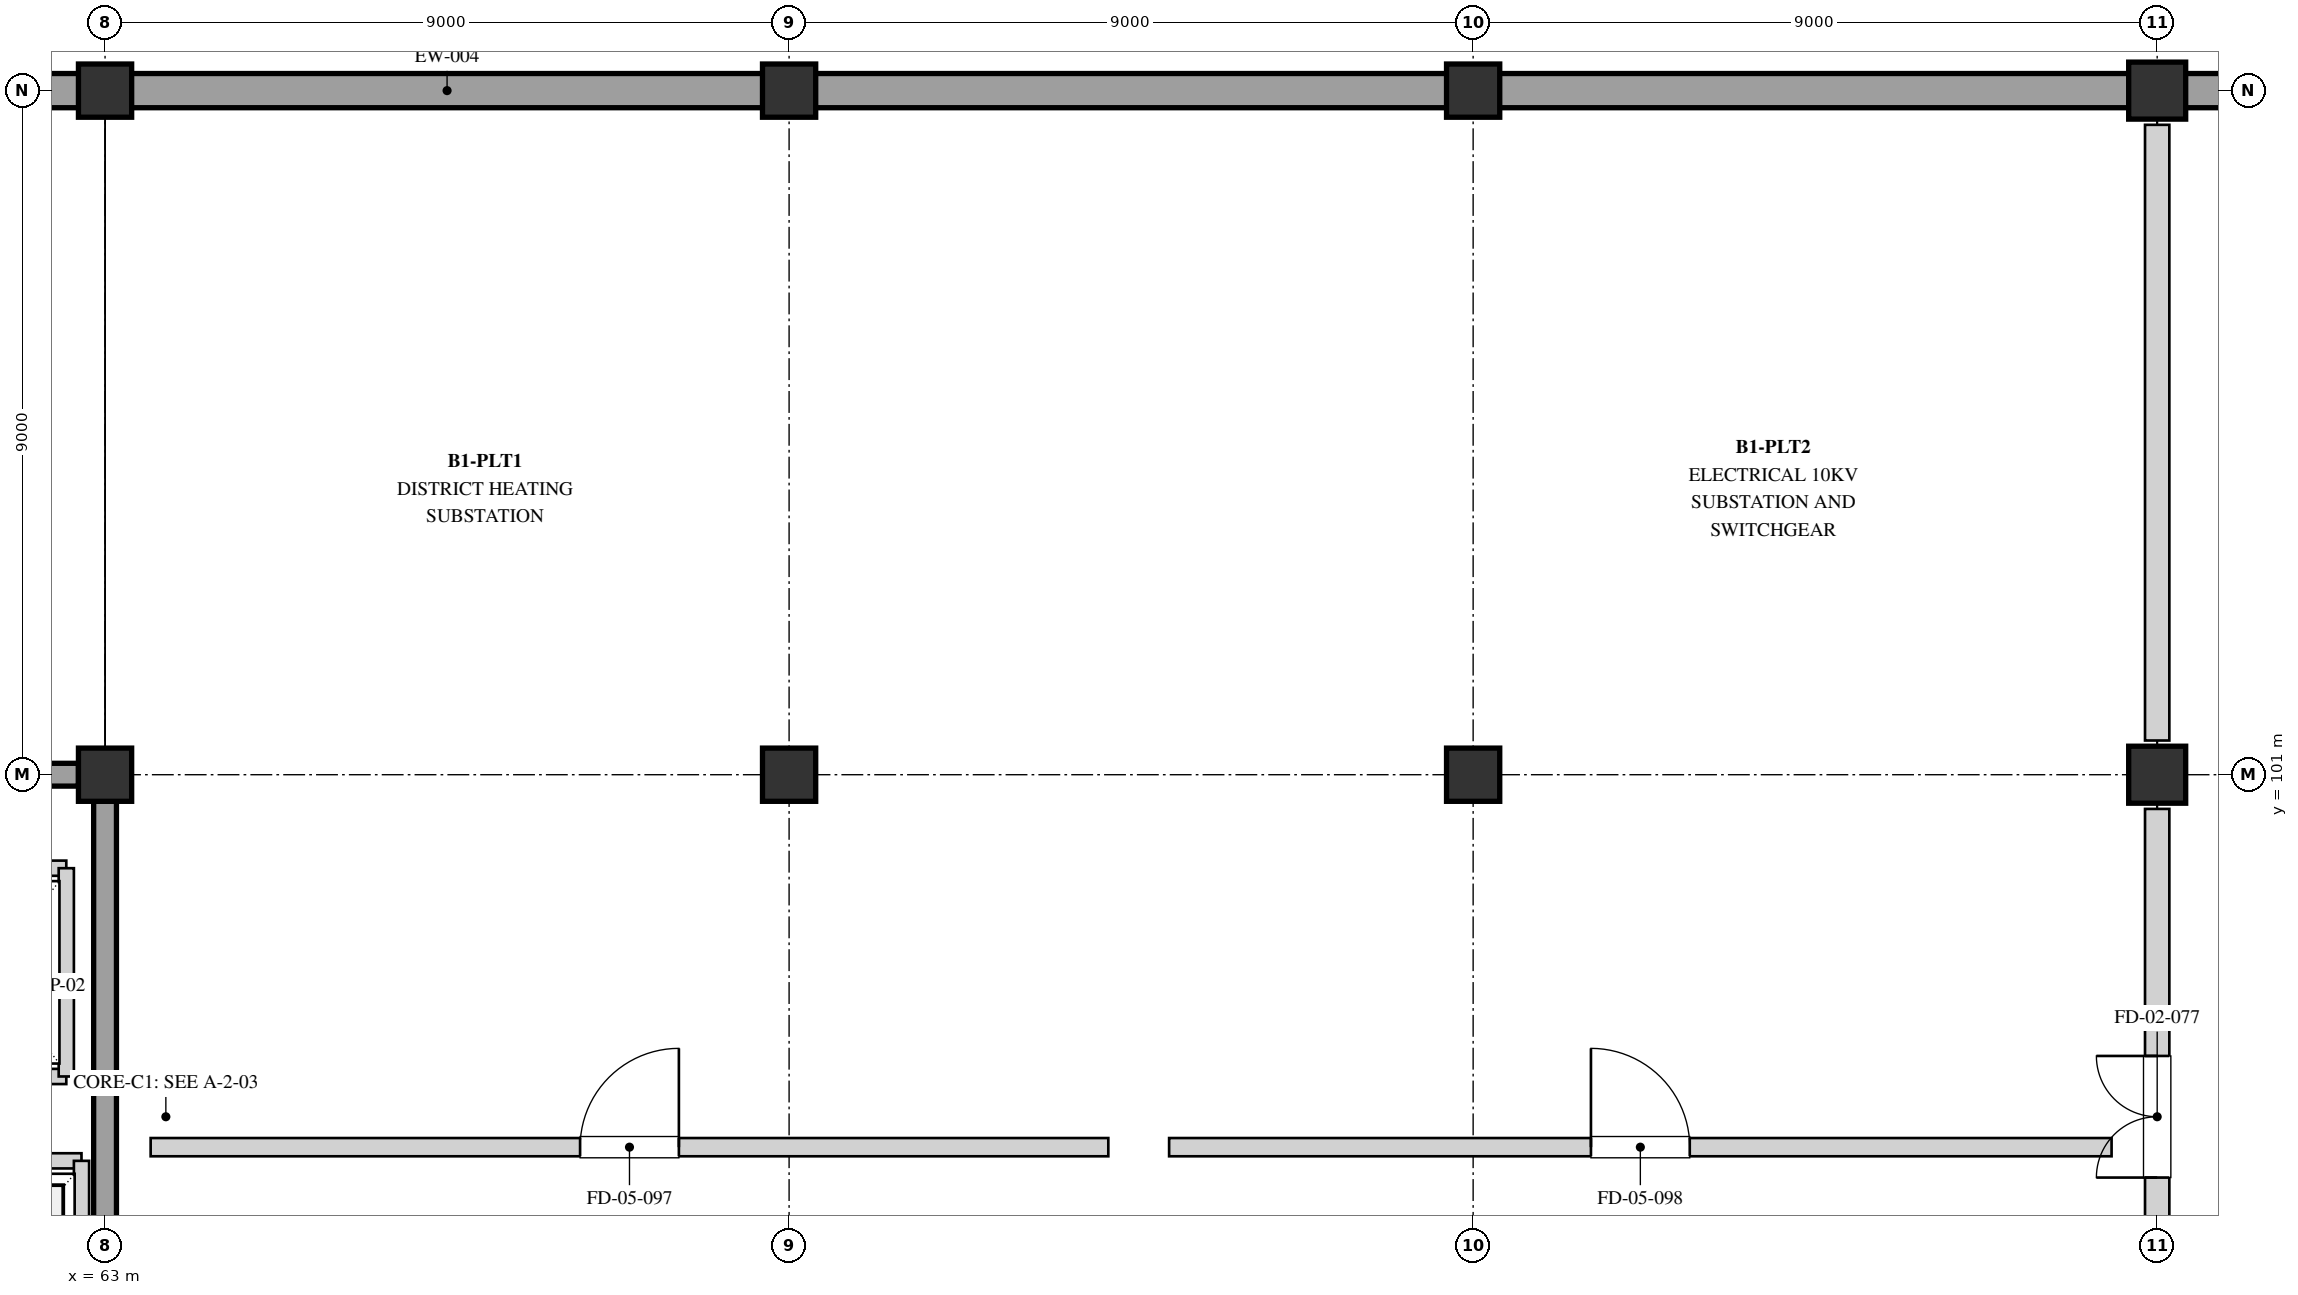
"""IFC4 building model, lengths in metres.
Left out: names, types, materials, properties, quantities, classifications, styles, units other than length and angle.
Written with IfcOpenShell. Run it as: python <this file> out.ifc"""

import sys

from ifc_helpers import new_model, si_unit, direction, frame, frame_2d, origin, origin_2d, place, context, subcontext, project, spatial, rectangle, extrude, element, fill, save


model = new_model("IFC4")
c1 = context("Model", 3, precision=1e-05, world=origin(), true_north=direction((0.0, 1.0)))
c2 = subcontext(c1, "Body", "Model", "MODEL_VIEW")
j1 = project(units=[si_unit("LENGTHUNIT", "METRE"), si_unit("PLANEANGLEUNIT", "RADIAN")], contexts=[c1])
p1 = place(None, origin())
s1 = spatial("IfcSite", under=j1, at=p1, CompositionType="ELEMENT")
p2 = place(p1, origin())
s2 = spatial("IfcBuilding", under=s1, at=p2, CompositionType="ELEMENT")
p3 = place(p2, frame((0.0, 0.0, -4.2)))
s3 = spatial("IfcBuildingStorey", under=s2, at=p3, CompositionType="ELEMENT", Elevation=-4.2)
for number, where, z_axis, x_axis in (
    (1, (63.0, 101.0, 0.0), (0.0, 0.0, 1.0), (1.0, 0.0, 0.0)),
    (2, (63.0, 110.0, 0.0), (0.0, 0.0, 1.0), (1.0, 0.0, 0.0)),
    (3, (72.0, 101.0, 0.0), (0.0, 0.0, 1.0), (1.0, 0.0, 0.0)),
    (4, (72.0, 110.0, 0.0), (0.0, 0.0, 1.0), (1.0, 0.0, 0.0)),
    (5, (81.0, 101.0, 0.0), (0.0, 0.0, 1.0), (1.0, 0.0, 0.0)),
    (6, (81.0, 110.0, 0.0), (0.0, 0.0, 1.0), (1.0, 0.0, 0.0)),
):
    element("IfcColumn", number, at=place(p3, frame(where, z_axis=z_axis, x_axis=x_axis)), inside=s3, PredefinedType="COLUMN", context=c2, shape_type="SweptSolid", body=[
        extrude(rectangle(XDim=0.7, YDim=0.7, at=origin_2d()), origin(), (0.0, 0.0, 1.0), 4.2),
    ])
for number, where, z_axis, x_axis in (
    (7, (90.0, 101.0, 0.0), (0.0, 0.0, 1.0), (1.0, 0.0, 0.0)),
    (8, (90.0, 110.0, 0.0), (0.0, 0.0, 1.0), (1.0, 0.0, 0.0)),
):
    element("IfcColumn", number, at=place(p3, frame(where, z_axis=z_axis, x_axis=x_axis)), inside=s3, PredefinedType="COLUMN", context=c2, shape_type="SweptSolid", body=[
        extrude(rectangle(XDim=0.75, YDim=0.75, at=origin_2d()), origin(), (0.0, 0.0, 1.0), 4.2),
    ])
p4 = place(p3, frame((54.8, 110.0, 0.0), z_axis=(0.0, 0.0, 1.0), x_axis=(1.0, 0.0, 0.0)))
e9 = element("IfcWall", 9, at=p4, inside=s3, PredefinedType="USERDEFINED", context=c2, shape_type="SweptSolid", body=[
    extrude(rectangle(XDim=8.2, YDim=0.45, at=frame_2d((4.1, 0.0))), origin(), (0.0, 0.0, 1.0), 3.86),
])
for number, where, z_axis, x_axis in (
    (10, (63.0, 110.0, 0.0), (0.0, 0.0, 1.0), (1.0, 0.0, 0.0)),
    (11, (72.0, 110.0, 0.0), (0.0, 0.0, 1.0), (1.0, 0.0, 0.0)),
    (12, (81.0, 110.0, 0.0), (0.0, 0.0, 1.0), (1.0, 0.0, 0.0)),
    (13, (90.0, 110.0, 0.0), (0.0, 0.0, 1.0), (1.0, 0.0, 0.0)),
):
    element("IfcWall", number, at=place(p3, frame(where, z_axis=z_axis, x_axis=x_axis)), inside=s3, PredefinedType="USERDEFINED", context=c2, shape_type="SweptSolid", body=[
        extrude(rectangle(XDim=9.0, YDim=0.45, at=frame_2d((4.5, 0.0))), origin(), (0.0, 0.0, 1.0), 3.86),
    ])
p5 = place(p3, frame((63.0, 92.35, 0.0), z_axis=(0.0, 0.0, 1.0), x_axis=(0.0, 1.0, 0.0)))
e14 = element("IfcWall", 14, at=p5, inside=s3, PredefinedType="SHEAR", context=c2, shape_type="SweptSolid", body=[
    extrude(rectangle(XDim=8.3, YDim=0.3, at=frame_2d((4.15, 0.0))), origin(), (0.0, 0.0, 1.0), 3.82),
])
p6 = place(p3, frame((55.15, 101.0, 0.0), z_axis=(0.0, 0.0, 1.0), x_axis=(1.0, 0.0, 0.0)))
e15 = element("IfcWall", 15, at=p6, inside=s3, PredefinedType="SHEAR", context=c2, shape_type="SweptSolid", body=[
    extrude(rectangle(XDim=7.5, YDim=0.3, at=frame_2d((3.75, 0.0))), origin(), (0.0, 0.0, 1.0), 3.82),
])
p7 = place(p3, frame((60.21, 95.92, 0.0), z_axis=(0.0, 0.0, 1.0), x_axis=(1.0, 0.0, 0.0)))
e16 = element("IfcWall", 16, at=p7, inside=s3, PredefinedType="SOLIDWALL", context=c2, shape_type="SweptSolid", body=[
    extrude(rectangle(XDim=2.48, YDim=0.2, at=frame_2d((1.24, 0.0))), origin(), (0.0, 0.0, 1.0), 2.85),
])
p8 = place(p3, frame((62.69, 92.88, 0.0), z_axis=(0.0, 0.0, 1.0), x_axis=(0.0, 1.0, 0.0)))
e17 = element("IfcWall", 17, at=p8, inside=s3, PredefinedType="SOLIDWALL", context=c2, shape_type="SweptSolid", body=[
    extrude(rectangle(XDim=3.04, YDim=0.2, at=frame_2d((1.52, 0.0))), origin(), (0.0, 0.0, 1.0), 2.85),
])
for number, where, z_axis, x_axis in (
    (18, (60.41, 97.03, 0.0), (0.0, 0.0, 1.0), (1.0, 0.0, 0.0)),
    (19, (60.41, 99.77, 0.0), (0.0, 0.0, 1.0), (1.0, 0.0, 0.0)),
):
    element("IfcWall", number, at=place(p3, frame(where, z_axis=z_axis, x_axis=x_axis)), inside=s3, PredefinedType="SOLIDWALL", context=c2, shape_type="SweptSolid", body=[
        extrude(rectangle(XDim=2.08, YDim=0.2, at=frame_2d((1.04, 0.0))), origin(), (0.0, 0.0, 1.0), 2.85),
    ])
p9 = place(p3, frame((62.49, 97.03, 0.0), z_axis=(0.0, 0.0, 1.0), x_axis=(0.0, 1.0, 0.0)))
e20 = element("IfcWall", 20, at=p9, inside=s3, PredefinedType="SOLIDWALL", context=c2, shape_type="SweptSolid", body=[
    extrude(rectangle(XDim=2.74, YDim=0.2, at=frame_2d((1.37, 0.0))), origin(), (0.0, 0.0, 1.0), 2.85),
])
p10 = place(p3, frame((90.0, 92.45, 0.0), z_axis=(0.0, 0.0, 1.0), x_axis=(0.0, 1.0, 0.0)))
e21 = element("IfcWall", 21, at=p10, inside=s3, PredefinedType="SOLIDWALL", context=c2, shape_type="SweptSolid", body=[
    extrude(rectangle(XDim=8.1, YDim=0.32, at=frame_2d((4.05, 0.0))), origin(), (0.0, 0.0, 1.0), 2.85),
])
p11 = place(p10, frame((3.25, 0.0, 0.0)))
e22 = element("IfcOpeningElement", 22, at=p11, cuts=e21, PredefinedType="OPENING", context=c2, shape_type="SweptSolid", body=[
    extrude(rectangle(XDim=1.6, YDim=2.2, at=frame_2d((0.8, 1.1))), frame((0.0, 0.17, 0.0), z_axis=(0.0, -1.0, 0.0), x_axis=(1.0, 0.0, 0.0)), (0.0, 0.0, 1.0), 0.34),
])
p12 = place(p3, frame((90.0, 101.45, 0.0), z_axis=(0.0, 0.0, 1.0), x_axis=(0.0, 1.0, 0.0)))
e23 = element("IfcWall", 23, at=p12, inside=s3, PredefinedType="SOLIDWALL", context=c2, shape_type="SweptSolid", body=[
    extrude(rectangle(XDim=8.1, YDim=0.32, at=frame_2d((4.05, 0.0))), origin(), (0.0, 0.0, 1.0), 2.85),
])
p13 = place(p3, frame((63.6, 96.1, 0.0), z_axis=(0.0, 0.0, 1.0), x_axis=(1.0, 0.0, 0.0)))
e24 = element("IfcWall", 24, at=p13, inside=s3, PredefinedType="SOLIDWALL", context=c2, shape_type="SweptSolid", body=[
    extrude(rectangle(XDim=12.6, YDim=0.24, at=frame_2d((6.3, 0.0))), origin(), (0.0, 0.0, 1.0), 2.85),
])
p14 = place(p13, frame((5.65, 0.0, 0.0)))
e25 = element("IfcOpeningElement", 25, at=p14, cuts=e24, PredefinedType="OPENING", context=c2, shape_type="SweptSolid", body=[
    extrude(rectangle(XDim=1.3, YDim=2.2, at=frame_2d((0.65, 1.1))), frame((0.0, 0.13, 0.0), z_axis=(0.0, -1.0, 0.0), x_axis=(1.0, 0.0, 0.0)), (0.0, 0.0, 1.0), 0.26),
])
p15 = place(p3, frame((77.0, 96.1, 0.0), z_axis=(0.0, 0.0, 1.0), x_axis=(1.0, 0.0, 0.0)))
e26 = element("IfcWall", 26, at=p15, inside=s3, PredefinedType="SOLIDWALL", context=c2, shape_type="SweptSolid", body=[
    extrude(rectangle(XDim=12.4, YDim=0.24, at=frame_2d((6.2, 0.0))), origin(), (0.0, 0.0, 1.0), 2.85),
])
p16 = place(p15, frame((5.55, 0.0, 0.0)))
e27 = element("IfcOpeningElement", 27, at=p16, cuts=e26, PredefinedType="OPENING", context=c2, shape_type="SweptSolid", body=[
    extrude(rectangle(XDim=1.3, YDim=2.2, at=frame_2d((0.65, 1.1))), frame((0.0, 0.13, 0.0), z_axis=(0.0, -1.0, 0.0), x_axis=(1.0, 0.0, 0.0)), (0.0, 0.0, 1.0), 0.26),
])
p17 = place(p11, origin())
e28 = element("IfcDoor", 28, at=p17, inside=s3, OperationType="DOUBLE_DOOR_SINGLE_SWING", PredefinedType="DOOR", context=c2, shape_type="SweptSolid", body=[
    extrude(rectangle(XDim=1.6, YDim=2.2, at=frame_2d((0.8, 1.1))), frame((0.0, 0.025, 0.0), z_axis=(0.0, -1.0, 0.0), x_axis=(1.0, 0.0, 0.0)), (0.0, 0.0, 1.0), 0.05),
])
fill(e22, e28)
p18 = place(p14, origin())
e29 = element("IfcDoor", 29, at=p18, inside=s3, OperationType="SINGLE_SWING_RIGHT", PredefinedType="DOOR", context=c2, shape_type="SweptSolid", body=[
    extrude(rectangle(XDim=1.3, YDim=2.2, at=frame_2d((0.65, 1.1))), frame((0.0, 0.025, 0.0), z_axis=(0.0, -1.0, 0.0), x_axis=(1.0, 0.0, 0.0)), (0.0, 0.0, 1.0), 0.05),
])
fill(e25, e29)
p19 = place(p16, origin())
e30 = element("IfcDoor", 30, at=p19, inside=s3, OperationType="SINGLE_SWING_LEFT", PredefinedType="DOOR", context=c2, shape_type="SweptSolid", body=[
    extrude(rectangle(XDim=1.3, YDim=2.2, at=frame_2d((0.65, 1.1))), frame((0.0, 0.025, 0.0), z_axis=(0.0, -1.0, 0.0), x_axis=(1.0, 0.0, 0.0)), (0.0, 0.0, 1.0), 0.05),
])
fill(e27, e30)
save(model, sys.argv[1])
